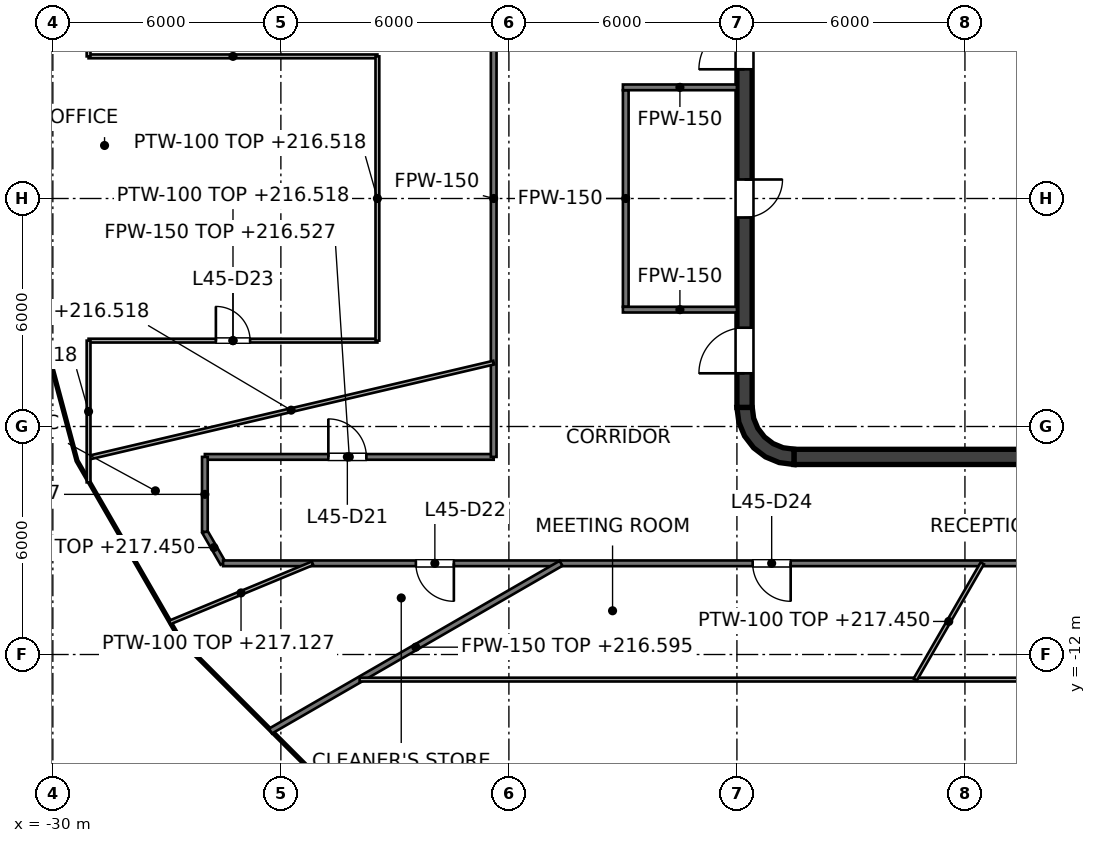
"""IFC4 building model, lengths in metres.
Left out: names, types, materials, properties, quantities, classifications, styles, units other than length and angle.
Written with IfcOpenShell. Run it as: python <this file> out.ifc"""

import sys

from ifc_helpers import new_model, si_unit, direction, frame, frame_2d, origin, place, context, subcontext, project, spatial, polyline, rectangle, outline, extrude, element, fill, save


model = new_model("IFC4")
c1 = context("Model", 3, precision=1e-05, world=origin(), true_north=direction((0.0, 1.0)))
c2 = subcontext(c1, "Body", "Model", "MODEL_VIEW")
j1 = project(units=[si_unit("LENGTHUNIT", "METRE"), si_unit("PLANEANGLEUNIT", "RADIAN")], contexts=[c1])
p1 = place(None, origin())
s1 = spatial("IfcSite", under=j1, at=p1, CompositionType="ELEMENT")
p2 = place(p1, origin())
s2 = spatial("IfcBuilding", under=s1, at=p2, CompositionType="ELEMENT")
p3 = place(p2, frame((0.0, 0.0, 213.6)))
s3 = spatial("IfcBuildingStorey", under=s2, at=p3, CompositionType="ELEMENT", Elevation=213.6)
p4 = place(p3, frame((-10.5, -6.8, 0.0), z_axis=(0.0, 0.0, 1.0), x_axis=(1.0, 0.0, 0.0)))
e1 = element("IfcWall", 1, at=p4, inside=s3, PredefinedType="SHEAR", context=c2, shape_type="SweptSolid", body=[
    extrude(rectangle(XDim=21.0, YDim=0.4, at=frame_2d((10.5, 0.0))), origin(), (0.0, 0.0, 1.0), 4.0),
])
p5 = place(p3, frame((-11.8, -5.5, 0.0), z_axis=(0.0, 0.0, 1.0), x_axis=(0.0, 1.0, 0.0)))
e2 = element("IfcWall", 2, at=p5, inside=s3, PredefinedType="SHEAR", context=c2, shape_type="SweptSolid", body=[
    extrude(rectangle(XDim=11.0, YDim=0.4, at=frame_2d((5.5, 0.0))), origin(), (0.0, 0.0, 1.0), 4.0),
])
p6 = place(p5, frame((5.0, 0.0, 0.0)))
e3 = element("IfcOpeningElement", 3, at=p6, cuts=e2, PredefinedType="OPENING", context=c2, shape_type="SweptSolid", body=[
    extrude(rectangle(XDim=1.0, YDim=2.1, at=frame_2d((0.5, 1.05))), frame((0.0, 0.2, 0.0), z_axis=(0.0, -1.0, 0.0), x_axis=(1.0, 0.0, 0.0)), (0.0, 0.0, 1.0), 0.4),
])
p7 = place(p5, frame((0.9, 0.0, 0.0)))
e4 = element("IfcOpeningElement", 4, at=p7, cuts=e2, PredefinedType="OPENING", context=c2, shape_type="SweptSolid", body=[
    extrude(rectangle(XDim=1.2, YDim=2.1, at=frame_2d((0.6, 1.05))), frame((0.0, 0.2, 0.0), z_axis=(0.0, -1.0, 0.0), x_axis=(1.0, 0.0, 0.0)), (0.0, 0.0, 1.0), 0.4),
])
p8 = place(p5, frame((8.9, 0.0, 0.0)))
e5 = element("IfcOpeningElement", 5, at=p8, cuts=e2, PredefinedType="OPENING", context=c2, shape_type="SweptSolid", body=[
    extrude(rectangle(XDim=1.2, YDim=2.1, at=frame_2d((0.6, 1.05))), frame((0.0, 0.2, 0.0), z_axis=(0.0, -1.0, 0.0), x_axis=(1.0, 0.0, 0.0)), (0.0, 0.0, 1.0), 0.4),
])
p9 = place(p3, origin())
e6 = element("IfcWall", 6, at=p9, inside=s3, PredefinedType="SHEAR", context=c2, shape_type="SweptSolid", body=[
    extrude(outline(polyline([(-10.5, -7.0), (-10.5, -6.596), (-10.784, -6.559), (-11.048, -6.45), (-11.275, -6.275), (-11.45, -6.048), (-11.559, -5.784), (-11.596, -5.5), (-12.0, -5.5), (-11.949, -5.888), (-11.799, -6.25), (-11.561, -6.561), (-11.25, -6.799), (-10.888, -6.949), (-10.5, -7.0)])), origin(), (0.0, 0.0, 1.0), 4.0),
])
p10 = place(p3, frame((-9.0, -6.6, 0.0), z_axis=(0.0, 0.0, 1.0), x_axis=(0.0, 1.0, 0.0)))
e7 = element("IfcWall", 7, at=p10, inside=s3, PredefinedType="PARTITIONING", context=c2, shape_type="SweptSolid", body=[
    extrude(rectangle(XDim=2.5, YDim=0.25, at=frame_2d((1.25, 0.0))), origin(), (0.0, 0.0, 1.0), 3.85),
])
p11 = place(p10, frame((0.75, 0.0, 0.0)))
e8 = element("IfcOpeningElement", 8, at=p11, cuts=e7, PredefinedType="OPENING", context=c2, shape_type="SweptSolid", body=[
    extrude(rectangle(XDim=1.0, YDim=2.1, at=frame_2d((0.5, 1.05))), frame((0.0, 0.125, 0.0), z_axis=(0.0, -1.0, 0.0), x_axis=(1.0, 0.0, 0.0)), (0.0, 0.0, 1.0), 0.25),
])
p12 = place(p3, frame((-9.125, 1.525, 0.0), z_axis=(0.0, 0.0, 1.0), x_axis=(1.0, 0.0, 0.0)))
e9 = element("IfcWall", 9, at=p12, inside=s3, PredefinedType="SOLIDWALL", context=c2, shape_type="SweptSolid", body=[
    extrude(rectangle(XDim=8.35, YDim=0.25, at=frame_2d((4.175, 0.0))), origin(), (0.0, 0.0, 1.0), 3.85),
])
p13 = place(p12, frame((0.925, 0.0, 0.0)))
e10 = element("IfcOpeningElement", 10, at=p13, cuts=e9, PredefinedType="OPENING", context=c2, shape_type="SweptSolid", body=[
    extrude(rectangle(XDim=1.1, YDim=2.1, at=frame_2d((0.55, 1.05))), frame((0.0, 0.125, 0.0), z_axis=(0.0, -1.0, 0.0), x_axis=(1.0, 0.0, 0.0)), (0.0, 0.0, 1.0), 0.25),
])
p14 = place(p12, frame((3.625, 0.0, 0.0)))
e11 = element("IfcOpeningElement", 11, at=p14, cuts=e9, PredefinedType="OPENING", context=c2, shape_type="SweptSolid", body=[
    extrude(rectangle(XDim=1.1, YDim=2.1, at=frame_2d((0.55, 1.05))), frame((0.0, 0.125, 0.0), z_axis=(0.0, -1.0, 0.0), x_axis=(1.0, 0.0, 0.0)), (0.0, 0.0, 1.0), 0.25),
])
p15 = place(p12, frame((6.325, 0.0, 0.0)))
e12 = element("IfcOpeningElement", 12, at=p15, cuts=e9, PredefinedType="OPENING", context=c2, shape_type="SweptSolid", body=[
    extrude(rectangle(XDim=1.1, YDim=2.1, at=frame_2d((0.55, 1.05))), frame((0.0, 0.125, 0.0), z_axis=(0.0, -1.0, 0.0), x_axis=(1.0, 0.0, 0.0)), (0.0, 0.0, 1.0), 0.25),
])
for number, where, z_axis, x_axis in (
    (13, (-9.0, 1.65, 0.0), (0.0, 0.0, 1.0), (0.0, 1.0, 0.0)),
    (14, (-6.3, 1.65, 0.0), (0.0, 0.0, 1.0), (0.0, 1.0, 0.0)),
):
    element("IfcWall", number, at=place(p3, frame(where, z_axis=z_axis, x_axis=x_axis)), inside=s3, PredefinedType="SOLIDWALL", context=c2, shape_type="SweptSolid", body=[
        extrude(rectangle(XDim=2.2, YDim=0.25, at=frame_2d((1.1, 0.0))), origin(), (0.0, 0.0, 1.0), 3.85),
    ])
p16 = place(p3, frame((-9.125, -1.525, 0.0), z_axis=(0.0, 0.0, 1.0), x_axis=(1.0, 0.0, 0.0)))
e15 = element("IfcWall", 15, at=p16, inside=s3, PredefinedType="SOLIDWALL", context=c2, shape_type="SweptSolid", body=[
    extrude(rectangle(XDim=18.25, YDim=0.25, at=frame_2d((9.125, 0.0))), origin(), (0.0, 0.0, 1.0), 3.85),
])
p17 = place(p16, frame((7.15, 0.0, 0.0)))
e16 = element("IfcOpeningElement", 16, at=p17, cuts=e15, PredefinedType="OPENING", context=c2, shape_type="SweptSolid", body=[
    extrude(rectangle(XDim=1.2, YDim=2.1, at=frame_2d((0.6, 1.05))), frame((0.0, 0.125, 0.0), z_axis=(0.0, -1.0, 0.0), x_axis=(1.0, 0.0, 0.0)), (0.0, 0.0, 1.0), 0.25),
])
p18 = place(p16, frame((10.2, 0.0, 0.0)))
e17 = element("IfcOpeningElement", 17, at=p18, cuts=e15, PredefinedType="OPENING", context=c2, shape_type="SweptSolid", body=[
    extrude(rectangle(XDim=1.2, YDim=2.1, at=frame_2d((0.6, 1.05))), frame((0.0, 0.125, 0.0), z_axis=(0.0, -1.0, 0.0), x_axis=(1.0, 0.0, 0.0)), (0.0, 0.0, 1.0), 0.25),
])
p19 = place(p16, frame((16.075, 0.0, 0.0)))
e18 = element("IfcOpeningElement", 18, at=p19, cuts=e15, PredefinedType="OPENING", context=c2, shape_type="SweptSolid", body=[
    extrude(rectangle(XDim=1.0, YDim=2.1, at=frame_2d((0.5, 1.05))), frame((0.0, 0.125, 0.0), z_axis=(0.0, -1.0, 0.0), x_axis=(1.0, 0.0, 0.0)), (0.0, 0.0, 1.0), 0.25),
])
p20 = place(p3, frame((-9.125, -3.975, 0.0), z_axis=(0.0, 0.0, 1.0), x_axis=(1.0, 0.0, 0.0)))
e19 = element("IfcWall", 19, at=p20, inside=s3, PredefinedType="SOLIDWALL", context=c2, shape_type="SweptSolid", body=[
    extrude(rectangle(XDim=12.4, YDim=0.25, at=frame_2d((6.2, 0.0))), origin(), (0.0, 0.0, 1.0), 3.85),
])
p21 = place(p20, frame((1.05, 0.0, 0.0)))
e20 = element("IfcOpeningElement", 20, at=p21, cuts=e19, PredefinedType="OPENING", context=c2, shape_type="SweptSolid", body=[
    extrude(rectangle(XDim=1.2, YDim=2.1, at=frame_2d((0.6, 1.05))), frame((0.0, 0.125, 0.0), z_axis=(0.0, -1.0, 0.0), x_axis=(1.0, 0.0, 0.0)), (0.0, 0.0, 1.0), 0.25),
])
p22 = place(p20, frame((4.1, 0.0, 0.0)))
e21 = element("IfcOpeningElement", 21, at=p22, cuts=e19, PredefinedType="OPENING", context=c2, shape_type="SweptSolid", body=[
    extrude(rectangle(XDim=1.2, YDim=2.1, at=frame_2d((0.6, 1.05))), frame((0.0, 0.125, 0.0), z_axis=(0.0, -1.0, 0.0), x_axis=(1.0, 0.0, 0.0)), (0.0, 0.0, 1.0), 0.25),
])
for number, where, z_axis, x_axis in (
    (22, (-9.0, -3.85, 0.0), (0.0, 0.0, 1.0), (0.0, 1.0, 0.0)),
    (23, (-5.95, -3.85, 0.0), (0.0, 0.0, 1.0), (0.0, 1.0, 0.0)),
):
    element("IfcWall", number, at=place(p3, frame(where, z_axis=z_axis, x_axis=x_axis)), inside=s3, PredefinedType="SOLIDWALL", context=c2, shape_type="SweptSolid", body=[
        extrude(rectangle(XDim=2.2, YDim=0.25, at=frame_2d((1.1, 0.0))), origin(), (0.0, 0.0, 1.0), 3.85),
    ])
p23 = place(p3, frame((-14.925, -2.85, 0.0), z_axis=(0.0, 0.0, 1.0), x_axis=(0.0, 1.0, 0.0)))
e24 = element("IfcWall", 24, at=p23, inside=s3, PredefinedType="PARTITIONING", context=c2, shape_type="SweptSolid", body=[
    extrude(rectangle(XDim=5.7, YDim=0.15, at=frame_2d((2.85, 0.0))), origin(), (0.0, 0.0, 1.0), 2.918),
])
for number, where, z_axis, x_axis in (
    (25, (-15.0, 2.925, 0.0), (0.0, 0.0, 1.0), (1.0, 0.0, 0.0)),
    (26, (-15.0, -2.925, 0.0), (0.0, 0.0, 1.0), (1.0, 0.0, 0.0)),
):
    element("IfcWall", number, at=place(p3, frame(where, z_axis=z_axis, x_axis=x_axis)), inside=s3, PredefinedType="PARTITIONING", context=c2, shape_type="SweptSolid", body=[
        extrude(rectangle(XDim=3.0, YDim=0.15, at=frame_2d((1.5, 0.0))), origin(), (0.0, 0.0, 1.0), 2.918),
    ])
p24 = place(p3, frame((-26.0, -8.771, 0.0), z_axis=(0.0, 0.0, 1.0), x_axis=(0.499869636591, -0.866100656052, 0.0)))
e27 = element("IfcWall", 27, at=p24, inside=s3, PredefinedType="PARTITIONING", context=c2, shape_type="SweptSolid", body=[
    extrude(rectangle(XDim=0.957, YDim=0.15, at=frame_2d((0.479, 0.0))), origin(), (0.0, 0.0, 1.0), 3.85),
])
p25 = place(p3, frame((-25.521, -9.6, 0.0), z_axis=(0.0, 0.0, 1.0), x_axis=(1.0, 0.0, 0.0)))
e28 = element("IfcWall", 28, at=p25, inside=s3, PredefinedType="PARTITIONING", context=c2, shape_type="SweptSolid", body=[
    extrude(rectangle(XDim=51.042, YDim=0.15, at=frame_2d((25.521, 0.0))), origin(), (0.0, 0.0, 1.0), 2.927),
])
p26 = place(p25, frame((5.073, 0.0, 0.0)))
e29 = element("IfcOpeningElement", 29, at=p26, cuts=e28, PredefinedType="OPENING", context=c2, shape_type="SweptSolid", body=[
    extrude(rectangle(XDim=1.0, YDim=2.1, at=frame_2d((0.5, 1.05))), frame((0.0, 0.075, 0.0), z_axis=(0.0, -1.0, 0.0), x_axis=(1.0, 0.0, 0.0)), (0.0, 0.0, 1.0), 0.15),
])
p27 = place(p25, frame((13.936, 0.0, 0.0)))
e30 = element("IfcOpeningElement", 30, at=p27, cuts=e28, PredefinedType="OPENING", context=c2, shape_type="SweptSolid", body=[
    extrude(rectangle(XDim=1.0, YDim=2.1, at=frame_2d((0.5, 1.05))), frame((0.0, 0.075, 0.0), z_axis=(0.0, -1.0, 0.0), x_axis=(1.0, 0.0, 0.0)), (0.0, 0.0, 1.0), 0.15),
])
p28 = place(p25, frame((23.485, 0.0, 0.0)))
e31 = element("IfcOpeningElement", 31, at=p28, cuts=e28, PredefinedType="OPENING", context=c2, shape_type="SweptSolid", body=[
    extrude(rectangle(XDim=1.0, YDim=2.1, at=frame_2d((0.5, 1.05))), frame((0.0, 0.075, 0.0), z_axis=(0.0, -1.0, 0.0), x_axis=(1.0, 0.0, 0.0)), (0.0, 0.0, 1.0), 0.15),
])
p29 = place(p25, frame((29.799, 0.0, 0.0)))
e32 = element("IfcOpeningElement", 32, at=p29, cuts=e28, PredefinedType="OPENING", context=c2, shape_type="SweptSolid", body=[
    extrude(rectangle(XDim=1.0, YDim=2.1, at=frame_2d((0.5, 1.05))), frame((0.0, 0.075, 0.0), z_axis=(0.0, -1.0, 0.0), x_axis=(1.0, 0.0, 0.0)), (0.0, 0.0, 1.0), 0.15),
])
p30 = place(p25, frame((36.152, 0.0, 0.0)))
e33 = element("IfcOpeningElement", 33, at=p30, cuts=e28, PredefinedType="OPENING", context=c2, shape_type="SweptSolid", body=[
    extrude(rectangle(XDim=1.0, YDim=2.1, at=frame_2d((0.5, 1.05))), frame((0.0, 0.075, 0.0), z_axis=(0.0, -1.0, 0.0), x_axis=(1.0, 0.0, 0.0)), (0.0, 0.0, 1.0), 0.15),
])
p31 = place(p25, frame((45.321, 0.0, 0.0)))
e34 = element("IfcOpeningElement", 34, at=p31, cuts=e28, PredefinedType="OPENING", context=c2, shape_type="SweptSolid", body=[
    extrude(rectangle(XDim=1.2, YDim=2.1, at=frame_2d((0.6, 1.05))), frame((0.0, 0.075, 0.0), z_axis=(0.0, -1.0, 0.0), x_axis=(1.0, 0.0, 0.0)), (0.0, 0.0, 1.0), 0.15),
])
p32 = place(p3, frame((-26.0, -6.8, 0.0), z_axis=(0.0, 0.0, 1.0), x_axis=(1.0, 0.0, 0.0)))
e35 = element("IfcWall", 35, at=p32, inside=s3, PredefinedType="PARTITIONING", context=c2, shape_type="SweptSolid", body=[
    extrude(rectangle(XDim=7.6, YDim=0.15, at=frame_2d((3.8, 0.0))), origin(), (0.0, 0.0, 1.0), 2.927),
])
p33 = place(p32, frame((3.249, 0.0, 0.0)))
e36 = element("IfcOpeningElement", 36, at=p33, cuts=e35, PredefinedType="OPENING", context=c2, shape_type="SweptSolid", body=[
    extrude(rectangle(XDim=1.0, YDim=2.1, at=frame_2d((0.5, 1.05))), frame((0.0, 0.075, 0.0), z_axis=(0.0, -1.0, 0.0), x_axis=(1.0, 0.0, 0.0)), (0.0, 0.0, 1.0), 0.15),
])
p34 = place(p3, frame((-24.273, -14.014, 0.0), z_axis=(0.0, 0.0, 1.0), x_axis=(0.866027156147, 0.499996964807, 0.0)))
e37 = element("IfcWall", 37, at=p34, inside=s3, PredefinedType="PARTITIONING", context=c2, shape_type="SweptSolid", body=[
    extrude(rectangle(XDim=8.828, YDim=0.15, at=frame_2d((4.414, 0.0))), origin(), (0.0, 0.0, 1.0), 2.995),
])
p35 = place(p3, frame((-18.4, -6.8, 0.0), z_axis=(0.0, 0.0, 1.0), x_axis=(0.0, 1.0, 0.0)))
e38 = element("IfcWall", 38, at=p35, inside=s3, PredefinedType="PARTITIONING", context=c2, shape_type="SweptSolid", body=[
    extrude(rectangle(XDim=13.6, YDim=0.15, at=frame_2d((6.8, 0.0))), origin(), (0.0, 0.0, 1.0), 2.918),
])
p36 = place(p3, frame((-26.0, -8.771, 0.0), z_axis=(0.0, 0.0, 1.0), x_axis=(0.0, 1.0, 0.0)))
e39 = element("IfcWall", 39, at=p36, inside=s3, PredefinedType="PARTITIONING", context=c2, shape_type="SweptSolid", body=[
    extrude(rectangle(XDim=1.971, YDim=0.15, at=frame_2d((0.985, 0.0))), origin(), (0.0, 0.0, 1.0), 2.927),
])
p37 = place(p3, frame((-21.928, -12.66, 0.0), z_axis=(0.0, 0.0, 1.0), x_axis=(1.0, 0.0, 0.0)))
e40 = element("IfcWall", 40, at=p37, inside=s3, PredefinedType="PARTITIONING", context=c2, shape_type="SweptSolid", body=[
    extrude(rectangle(XDim=47.555, YDim=0.1, at=frame_2d((23.777, 0.0))), origin(), (0.0, 0.0, 1.0), 2.927),
])
p38 = place(p37, frame((19.02, 0.0, 0.0)))
e41 = element("IfcOpeningElement", 41, at=p38, cuts=e40, PredefinedType="OPENING", context=c2, shape_type="SweptSolid", body=[
    extrude(rectangle(XDim=1.8, YDim=2.1, at=frame_2d((0.9, 1.05))), frame((0.0, 0.05, 0.0), z_axis=(0.0, -1.0, 0.0), x_axis=(1.0, 0.0, 0.0)), (0.0, 0.0, 1.0), 0.1),
])
p39 = place(p37, frame((44.417, 0.0, 0.0)))
e42 = element("IfcOpeningElement", 42, at=p39, cuts=e40, PredefinedType="OPENING", context=c2, shape_type="SweptSolid", body=[
    extrude(rectangle(XDim=0.9, YDim=2.1, at=frame_2d((0.45, 1.05))), frame((0.0, 0.05, 0.0), z_axis=(0.0, -1.0, 0.0), x_axis=(1.0, 0.0, 0.0)), (0.0, 0.0, 1.0), 0.1),
])
p40 = place(p3, frame((-29.06, -3.74, 0.0), z_axis=(0.0, 0.0, 1.0), x_axis=(1.0, 0.0, 0.0)))
e43 = element("IfcWall", 43, at=p40, inside=s3, PredefinedType="PARTITIONING", context=c2, shape_type="SweptSolid", body=[
    extrude(rectangle(XDim=7.6, YDim=0.1, at=frame_2d((3.8, 0.0))), origin(), (0.0, 0.0, 1.0), 2.918),
])
p41 = place(p40, frame((3.35, 0.0, 0.0)))
e44 = element("IfcOpeningElement", 44, at=p41, cuts=e43, PredefinedType="OPENING", context=c2, shape_type="SweptSolid", body=[
    extrude(rectangle(XDim=0.9, YDim=2.1, at=frame_2d((0.45, 1.05))), frame((0.0, 0.05, 0.0), z_axis=(0.0, -1.0, 0.0), x_axis=(1.0, 0.0, 0.0)), (0.0, 0.0, 1.0), 0.1),
])
p42 = place(p3, frame((-29.06, 3.74, 0.0), z_axis=(0.0, 0.0, 1.0), x_axis=(1.0, 0.0, 0.0)))
e45 = element("IfcWall", 45, at=p42, inside=s3, PredefinedType="PARTITIONING", context=c2, shape_type="SweptSolid", body=[
    extrude(rectangle(XDim=7.6, YDim=0.1, at=frame_2d((3.8, 0.0))), origin(), (0.0, 0.0, 1.0), 2.918),
])
p43 = place(p3, frame((-29.06, -6.821, 0.0), z_axis=(0.0, 0.0, 1.0), x_axis=(0.973545675372, 0.228492489951, 0.0)))
e46 = element("IfcWall", 46, at=p43, inside=s3, PredefinedType="PARTITIONING", context=c2, shape_type="SweptSolid", body=[
    extrude(rectangle(XDim=10.95, YDim=0.1, at=frame_2d((5.475, 0.0))), origin(), (0.0, 0.0, 1.0), 2.918),
])
p44 = place(p3, frame((-26.93, -11.159, 0.0), z_axis=(0.0, 0.0, 1.0), x_axis=(0.923864138535, 0.382720594598, 0.0)))
e47 = element("IfcWall", 47, at=p44, inside=s3, PredefinedType="PARTITIONING", context=c2, shape_type="SweptSolid", body=[
    extrude(rectangle(XDim=4.073, YDim=0.1, at=frame_2d((2.037, 0.0))), origin(), (0.0, 0.0, 1.0), 3.527),
])
p45 = place(p3, frame((-7.309, -12.66, 0.0), z_axis=(0.0, 0.0, 1.0), x_axis=(0.499899920428, 0.866083177042, 0.0)))
e48 = element("IfcWall", 48, at=p45, inside=s3, PredefinedType="PARTITIONING", context=c2, shape_type="SweptSolid", body=[
    extrude(rectangle(XDim=3.533, YDim=0.1, at=frame_2d((1.767, 0.0))), origin(), (0.0, 0.0, 1.0), 3.85),
])
p46 = place(p3, frame((-21.46, -3.74, 0.0), z_axis=(0.0, 0.0, 1.0), x_axis=(0.0, 1.0, 0.0)))
e49 = element("IfcWall", 49, at=p46, inside=s3, PredefinedType="PARTITIONING", context=c2, shape_type="SweptSolid", body=[
    extrude(rectangle(XDim=7.48, YDim=0.1, at=frame_2d((3.74, 0.0))), origin(), (0.0, 0.0, 1.0), 2.918),
])
for number, where, z_axis, x_axis in (
    (50, (-29.06, -7.47, 0.0), (0.0, 0.0, 1.0), (0.0, 1.0, 0.0)),
    (51, (-29.06, 3.74, 0.0), (0.0, 0.0, 1.0), (0.0, 1.0, 0.0)),
):
    element("IfcWall", number, at=place(p3, frame(where, z_axis=z_axis, x_axis=x_axis)), inside=s3, PredefinedType="PARTITIONING", context=c2, shape_type="SweptSolid", body=[
        extrude(rectangle(XDim=3.73, YDim=0.1, at=frame_2d((1.865, 0.0))), origin(), (0.0, 0.0, 1.0), 2.918),
    ])
p47 = place(p13, origin())
e52 = element("IfcDoor", 52, at=p47, inside=s3, OperationType="DOUBLE_DOOR_SLIDING", PredefinedType="DOOR", context=c2, shape_type="SweptSolid", body=[
    extrude(rectangle(XDim=1.1, YDim=2.1, at=frame_2d((0.55, 1.05))), frame((0.0, 0.025, 0.0), z_axis=(0.0, -1.0, 0.0), x_axis=(1.0, 0.0, 0.0)), (0.0, 0.0, 1.0), 0.05),
])
fill(e10, e52)
p48 = place(p14, origin())
e53 = element("IfcDoor", 53, at=p48, inside=s3, OperationType="DOUBLE_DOOR_SLIDING", PredefinedType="DOOR", context=c2, shape_type="SweptSolid", body=[
    extrude(rectangle(XDim=1.1, YDim=2.1, at=frame_2d((0.55, 1.05))), frame((0.0, 0.025, 0.0), z_axis=(0.0, -1.0, 0.0), x_axis=(1.0, 0.0, 0.0)), (0.0, 0.0, 1.0), 0.05),
])
fill(e11, e53)
p49 = place(p21, origin())
e54 = element("IfcDoor", 54, at=p49, inside=s3, OperationType="DOUBLE_DOOR_SLIDING", PredefinedType="DOOR", context=c2, shape_type="SweptSolid", body=[
    extrude(rectangle(XDim=1.2, YDim=2.1, at=frame_2d((0.6, 1.05))), frame((0.0, 0.025, 0.0), z_axis=(0.0, -1.0, 0.0), x_axis=(1.0, 0.0, 0.0)), (0.0, 0.0, 1.0), 0.05),
])
fill(e20, e54)
p50 = place(p22, origin())
e55 = element("IfcDoor", 55, at=p50, inside=s3, OperationType="DOUBLE_DOOR_SLIDING", PredefinedType="DOOR", context=c2, shape_type="SweptSolid", body=[
    extrude(rectangle(XDim=1.2, YDim=2.1, at=frame_2d((0.6, 1.05))), frame((0.0, 0.025, 0.0), z_axis=(0.0, -1.0, 0.0), x_axis=(1.0, 0.0, 0.0)), (0.0, 0.0, 1.0), 0.05),
])
fill(e21, e55)
p51 = place(p11, origin())
e56 = element("IfcDoor", 56, at=p51, inside=s3, OperationType="SINGLE_SWING_LEFT", PredefinedType="DOOR", context=c2, shape_type="SweptSolid", body=[
    extrude(rectangle(XDim=1.0, YDim=2.1, at=frame_2d((0.5, 1.05))), frame((0.0, 0.025, 0.0), z_axis=(0.0, -1.0, 0.0), x_axis=(1.0, 0.0, 0.0)), (0.0, 0.0, 1.0), 0.05),
])
fill(e8, e56)
p52 = place(p6, origin())
e57 = element("IfcDoor", 57, at=p52, inside=s3, OperationType="SINGLE_SWING_RIGHT", PredefinedType="DOOR", context=c2, shape_type="SweptSolid", body=[
    extrude(rectangle(XDim=1.0, YDim=2.1, at=frame_2d((0.5, 1.05))), frame((0.0, 0.025, 0.0), z_axis=(0.0, -1.0, 0.0), x_axis=(1.0, 0.0, 0.0)), (0.0, 0.0, 1.0), 0.05),
])
fill(e3, e57)
p53 = place(p7, origin())
e58 = element("IfcDoor", 58, at=p53, inside=s3, OperationType="SINGLE_SWING_LEFT", PredefinedType="DOOR", context=c2, shape_type="SweptSolid", body=[
    extrude(rectangle(XDim=1.2, YDim=2.1, at=frame_2d((0.6, 1.05))), frame((0.0, 0.025, 0.0), z_axis=(0.0, -1.0, 0.0), x_axis=(1.0, 0.0, 0.0)), (0.0, 0.0, 1.0), 0.05),
])
fill(e4, e58)
p54 = place(p8, origin())
e59 = element("IfcDoor", 59, at=p54, inside=s3, OperationType="SINGLE_SWING_LEFT", PredefinedType="DOOR", context=c2, shape_type="SweptSolid", body=[
    extrude(rectangle(XDim=1.2, YDim=2.1, at=frame_2d((0.6, 1.05))), frame((0.0, 0.025, 0.0), z_axis=(0.0, -1.0, 0.0), x_axis=(1.0, 0.0, 0.0)), (0.0, 0.0, 1.0), 0.05),
])
fill(e5, e59)
p55 = place(p33, origin())
e60 = element("IfcDoor", 60, at=p55, inside=s3, OperationType="SINGLE_SWING_LEFT", PredefinedType="DOOR", context=c2, shape_type="SweptSolid", body=[
    extrude(rectangle(XDim=1.0, YDim=2.1, at=frame_2d((0.5, 1.05))), frame((0.0, 0.025, 0.0), z_axis=(0.0, -1.0, 0.0), x_axis=(1.0, 0.0, 0.0)), (0.0, 0.0, 1.0), 0.05),
])
fill(e36, e60)
p56 = place(p26, origin())
e61 = element("IfcDoor", 61, at=p56, inside=s3, OperationType="SINGLE_SWING_RIGHT", PredefinedType="DOOR", context=c2, shape_type="SweptSolid", body=[
    extrude(rectangle(XDim=1.0, YDim=2.1, at=frame_2d((0.5, 1.05))), frame((0.0, 0.025, 0.0), z_axis=(0.0, -1.0, 0.0), x_axis=(1.0, 0.0, 0.0)), (0.0, 0.0, 1.0), 0.05),
])
fill(e29, e61)
p57 = place(p41, origin())
e62 = element("IfcDoor", 62, at=p57, inside=s3, OperationType="SINGLE_SWING_LEFT", PredefinedType="DOOR", context=c2, shape_type="SweptSolid", body=[
    extrude(rectangle(XDim=0.9, YDim=2.1, at=frame_2d((0.45, 1.05))), frame((0.0, 0.025, 0.0), z_axis=(0.0, -1.0, 0.0), x_axis=(1.0, 0.0, 0.0)), (0.0, 0.0, 1.0), 0.05),
])
fill(e44, e62)
p58 = place(p27, origin())
e63 = element("IfcDoor", 63, at=p58, inside=s3, OperationType="SINGLE_SWING_RIGHT", PredefinedType="DOOR", context=c2, shape_type="SweptSolid", body=[
    extrude(rectangle(XDim=1.0, YDim=2.1, at=frame_2d((0.5, 1.05))), frame((0.0, 0.025, 0.0), z_axis=(0.0, -1.0, 0.0), x_axis=(1.0, 0.0, 0.0)), (0.0, 0.0, 1.0), 0.05),
])
fill(e30, e63)
save(model, sys.argv[1])
